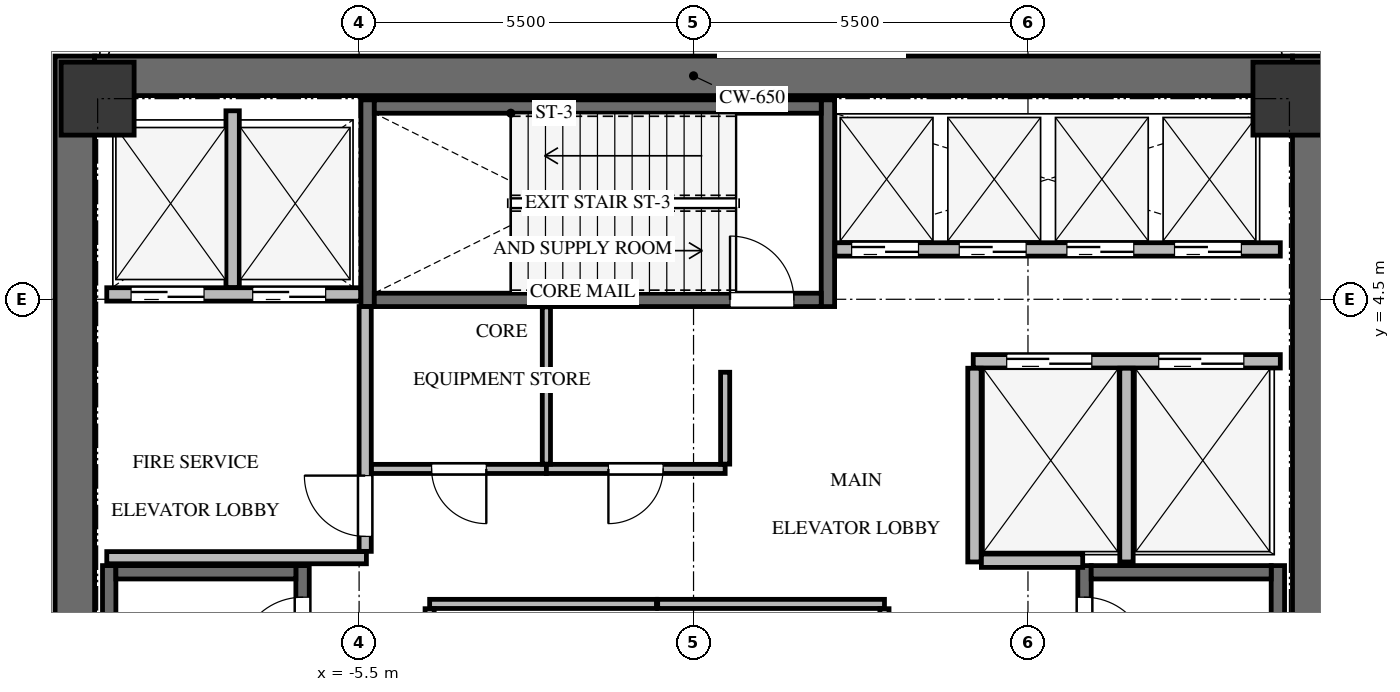
"""IFC4 building model, lengths in metres.
Left out: names, types, materials, properties, quantities, classifications, styles, units other than length and angle.
Written with IfcOpenShell. Run it as: python <this file> out.ifc"""

import sys

from ifc_helpers import new_model, si_unit, direction, frame, frame_2d, origin, origin_2d, place, context, subcontext, project, spatial, rectangle, extrude, source, transform, mapped, element, fill, save


model = new_model("IFC4")
c1 = context("Model", 3, precision=1e-05, world=origin(), true_north=direction((0.0, 1.0)))
c2 = subcontext(c1, "Body", "Model", "MODEL_VIEW")
j1 = project(units=[si_unit("LENGTHUNIT", "METRE"), si_unit("PLANEANGLEUNIT", "RADIAN")], contexts=[c1])
p1 = place(None, origin())
s1 = spatial("IfcSite", under=j1, at=p1, CompositionType="ELEMENT")
p2 = place(p1, origin())
s2 = spatial("IfcBuilding", under=s1, at=p2, CompositionType="ELEMENT")
p3 = place(p2, frame((0.0, 0.0, 213.4)))
s3 = spatial("IfcBuildingStorey", under=s2, at=p3, CompositionType="ELEMENT", Elevation=213.4)
for number, where, z_axis, x_axis in (
    (1, (-10.175, -8.5, 0.0), (0.0, 0.0, 1.0), (0.0, 1.0, 0.0)),
    (2, (10.175, -8.5, 0.0), (0.0, 0.0, 1.0), (0.0, 1.0, 0.0)),
):
    element("IfcWall", number, at=place(p3, frame(where, z_axis=z_axis, x_axis=x_axis)), inside=s3, PredefinedType="SHEAR", context=c2, shape_type="SweptSolid", body=[
        extrude(rectangle(XDim=17.0, YDim=0.65, at=frame_2d((8.5, 0.0))), origin(), (0.0, 0.0, 1.0), 4.9),
    ])
p4 = place(p3, frame((-9.85, 8.175, 0.0), z_axis=(0.0, 0.0, 1.0), x_axis=(1.0, 0.0, 0.0)))
e3 = element("IfcWall", 3, at=p4, inside=s3, PredefinedType="SHEAR", context=c2, shape_type="SweptSolid", body=[
    extrude(rectangle(XDim=19.7, YDim=0.65, at=frame_2d((9.85, 0.0))), origin(), (0.0, 0.0, 1.0), 4.9),
])
p5 = place(p3, frame((-6.43, -7.77, -0.3), z_axis=(0.0, 0.0, 1.0), x_axis=(0.0, 1.0, 0.0)))
e4 = element("IfcWall", 4, at=p5, inside=s3, PredefinedType="SHEAR", context=c2, shape_type="SweptSolid", body=[
    extrude(rectangle(XDim=7.89, YDim=0.22, at=frame_2d((3.945, 0.0))), origin(), (0.0, 0.0, 1.0), 4.96),
])
p6 = place(p5, frame((6.32, 0.0, 0.0)))
e5 = element("IfcOpeningElement", 5, at=p6, cuts=e4, PredefinedType="OPENING", context=c2, shape_type="SweptSolid", body=[
    extrude(rectangle(XDim=1.05, YDim=2.15, at=frame_2d((0.525, 1.075))), frame((0.0, 0.12, 0.0), z_axis=(0.0, -1.0, 0.0), x_axis=(1.0, 0.0, 0.0)), (0.0, 0.0, 1.0), 0.24),
])
p7 = place(p3, frame((-9.61, 0.12, -0.3), z_axis=(0.0, 0.0, 1.0), x_axis=(0.0, -1.0, 0.0)))
e6 = element("IfcWall", 6, at=p7, inside=s3, PredefinedType="SHEAR", context=c2, shape_type="SweptSolid", body=[
    extrude(rectangle(XDim=7.89, YDim=0.22, at=frame_2d((3.945, 0.0))), origin(), (0.0, 0.0, 1.0), 4.96),
])
p8 = place(p3, frame((-6.54, 0.01, -0.3), z_axis=(0.0, 0.0, 1.0), x_axis=(-1.0, 0.0, 0.0)))
e7 = element("IfcWall", 7, at=p8, inside=s3, PredefinedType="SHEAR", context=c2, shape_type="SweptSolid", body=[
    extrude(rectangle(XDim=2.96, YDim=0.22, at=frame_2d((1.48, 0.0))), origin(), (0.0, 0.0, 1.0), 4.96),
])
p9 = place(p3, frame((9.61, -7.77, -0.3), z_axis=(0.0, 0.0, 1.0), x_axis=(0.0, 1.0, 0.0)))
e8 = element("IfcWall", 8, at=p9, inside=s3, PredefinedType="SHEAR", context=c2, shape_type="SweptSolid", body=[
    extrude(rectangle(XDim=7.89, YDim=0.22, at=frame_2d((3.945, 0.0))), origin(), (0.0, 0.0, 1.0), 4.96),
])
p10 = place(p3, frame((6.43, 0.12, -0.3), z_axis=(0.0, 0.0, 1.0), x_axis=(0.0, -1.0, 0.0)))
e9 = element("IfcWall", 9, at=p10, inside=s3, PredefinedType="SHEAR", context=c2, shape_type="SweptSolid", body=[
    extrude(rectangle(XDim=7.89, YDim=0.22, at=frame_2d((3.945, 0.0))), origin(), (0.0, 0.0, 1.0), 4.96),
])
p11 = place(p10, frame((0.52, 0.0, 0.0)))
e10 = element("IfcOpeningElement", 10, at=p11, cuts=e9, PredefinedType="OPENING", context=c2, shape_type="SweptSolid", body=[
    extrude(rectangle(XDim=1.05, YDim=2.15, at=frame_2d((0.525, 1.075))), frame((0.0, 0.12, 0.0), z_axis=(0.0, -1.0, 0.0), x_axis=(1.0, 0.0, 0.0)), (0.0, 0.0, 1.0), 0.24),
])
p12 = place(p3, frame((9.5, 0.01, -0.3), z_axis=(0.0, 0.0, 1.0), x_axis=(-1.0, 0.0, 0.0)))
e11 = element("IfcWall", 11, at=p12, inside=s3, PredefinedType="SHEAR", context=c2, shape_type="SweptSolid", body=[
    extrude(rectangle(XDim=2.96, YDim=0.22, at=frame_2d((1.48, 0.0))), origin(), (0.0, 0.0, 1.0), 4.96),
])
for number, where, z_axis, x_axis in (
    (12, (2.21, 4.38, -0.3), (0.0, 0.0, 1.0), (0.0, 1.0, 0.0)),
    (13, (-5.36, 7.78, -0.3), (0.0, 0.0, 1.0), (0.0, -1.0, 0.0)),
):
    element("IfcWall", number, at=place(p3, frame(where, z_axis=z_axis, x_axis=x_axis)), inside=s3, PredefinedType="SHEAR", context=c2, shape_type="SweptSolid", body=[
        extrude(rectangle(XDim=3.4, YDim=0.22, at=frame_2d((1.7, 0.0))), origin(), (0.0, 0.0, 1.0), 4.96),
    ])
p13 = place(p3, frame((-5.25, 4.49, -0.3), z_axis=(0.0, 0.0, 1.0), x_axis=(1.0, 0.0, 0.0)))
e14 = element("IfcWall", 14, at=p13, inside=s3, PredefinedType="SHEAR", context=c2, shape_type="SweptSolid", body=[
    extrude(rectangle(XDim=7.35, YDim=0.22, at=frame_2d((3.675, 0.0))), origin(), (0.0, 0.0, 1.0), 4.96),
])
p14 = place(p13, frame((5.85, 0.0, 0.0)))
e15 = element("IfcOpeningElement", 15, at=p14, cuts=e14, PredefinedType="OPENING", context=c2, shape_type="SweptSolid", body=[
    extrude(rectangle(XDim=1.05, YDim=2.15, at=frame_2d((0.525, 1.075))), frame((0.0, 0.12, 0.0), z_axis=(0.0, -1.0, 0.0), x_axis=(1.0, 0.0, 0.0)), (0.0, 0.0, 1.0), 0.24),
])
p15 = place(p3, frame((2.1, 7.67, -0.3), z_axis=(0.0, 0.0, 1.0), x_axis=(-1.0, 0.0, 0.0)))
e16 = element("IfcWall", 16, at=p15, inside=s3, PredefinedType="SHEAR", context=c2, shape_type="SweptSolid", body=[
    extrude(rectangle(XDim=7.35, YDim=0.22, at=frame_2d((3.675, 0.0))), origin(), (0.0, 0.0, 1.0), 4.96),
])
m1 = source(origin(), c2, "Body", "SweptSolid", [
    extrude(rectangle(XDim=1.2, YDim=1.2, at=origin_2d()), origin(), (0.0, 0.0, 1.0), 4.96),
])
for number, where, z_axis, x_axis in (
    (17, (9.8, 7.8, -0.3), (0.0, 0.0, 1.0), (1.0, 0.0, 0.0)),
    (18, (-9.8, 7.8, -0.3), (0.0, 0.0, 1.0), (1.0, 0.0, 0.0)),
):
    element("IfcColumn", number, at=place(p3, frame(where, z_axis=z_axis, x_axis=x_axis)), inside=s3, PredefinedType="COLUMN", context=c2, shape_type="MappedRepresentation", body=[
        mapped(m1, transform((0.0, 0.0, 0.0), x_axis=(1.0, 0.0, 0.0), y_axis=(0.0, 1.0, 0.0), z_axis=(0.0, 0.0, 1.0), scale=1.0)),
    ])
p16 = place(p3, frame((-9.65, 4.58, 0.0), z_axis=(0.0, 0.0, 1.0), x_axis=(1.0, 0.0, 0.0)))
e19 = element("IfcWall", 19, at=p16, inside=s3, PredefinedType="SOLIDWALL", context=c2, shape_type="SweptSolid", body=[
    extrude(rectangle(XDim=4.175, YDim=0.22, at=frame_2d((2.087, 0.0))), origin(), (0.0, 0.0, 1.0), 4.645),
])
p17 = place(p16, frame((0.4, 0.0, 0.0)))
e20 = element("IfcOpeningElement", 20, at=p17, cuts=e19, PredefinedType="OPENING", context=c2, shape_type="SweptSolid", body=[
    extrude(rectangle(XDim=1.2, YDim=2.15, at=frame_2d((0.6, 1.075))), frame((0.0, 0.12, 0.0), z_axis=(0.0, -1.0, 0.0), x_axis=(1.0, 0.0, 0.0)), (0.0, 0.0, 1.0), 0.24),
])
p18 = place(p16, frame((2.4, 0.0, 0.0)))
e21 = element("IfcOpeningElement", 21, at=p18, cuts=e19, PredefinedType="OPENING", context=c2, shape_type="SweptSolid", body=[
    extrude(rectangle(XDim=1.2, YDim=2.15, at=frame_2d((0.6, 1.075))), frame((0.0, 0.12, 0.0), z_axis=(0.0, -1.0, 0.0), x_axis=(1.0, 0.0, 0.0)), (0.0, 0.0, 1.0), 0.24),
])
p19 = place(p3, frame((-7.58, 4.694, 0.0), z_axis=(0.0, 0.0, 1.0), x_axis=(0.0, 1.0, 0.0)))
e22 = element("IfcWall", 22, at=p19, inside=s3, PredefinedType="SOLIDWALL", context=c2, shape_type="SweptSolid", body=[
    extrude(rectangle(XDim=2.906, YDim=0.22, at=frame_2d((1.453, 0.0))), origin(), (0.0, 0.0, 1.0), 4.645),
])
p20 = place(p3, frame((-9.65, 0.25, 0.0), z_axis=(0.0, 0.0, 1.0), x_axis=(1.0, 0.0, 0.0)))
e23 = element("IfcWall", 23, at=p20, inside=s3, PredefinedType="SOLIDWALL", context=c2, shape_type="SweptSolid", body=[
    extrude(rectangle(XDim=4.27, YDim=0.2, at=frame_2d((2.135, 0.0))), origin(), (0.0, 0.0, 1.0), 4.645),
])
p21 = place(p3, frame((-5.4, 0.354, 0.0), z_axis=(0.0, 0.0, 1.0), x_axis=(0.0, 1.0, 0.0)))
e24 = element("IfcWall", 24, at=p21, inside=s3, PredefinedType="SOLIDWALL", context=c2, shape_type="SweptSolid", body=[
    extrude(rectangle(XDim=4.026, YDim=0.2, at=frame_2d((2.013, 0.0))), origin(), (0.0, 0.0, 1.0), 4.645),
])
p22 = place(p21, frame((0.246, 0.0, 0.0)))
e25 = element("IfcOpeningElement", 25, at=p22, cuts=e24, PredefinedType="OPENING", context=c2, shape_type="SweptSolid", body=[
    extrude(rectangle(XDim=1.0, YDim=2.15, at=frame_2d((0.5, 1.075))), frame((0.0, 0.11, 0.0), z_axis=(0.0, -1.0, 0.0), x_axis=(1.0, 0.0, 0.0)), (0.0, 0.0, 1.0), 0.22),
])
p23 = place(p3, frame((4.6, 3.48, 0.0), z_axis=(0.0, 0.0, 1.0), x_axis=(1.0, 0.0, 0.0)))
e26 = element("IfcWall", 26, at=p23, inside=s3, PredefinedType="SOLIDWALL", context=c2, shape_type="SweptSolid", body=[
    extrude(rectangle(XDim=5.05, YDim=0.22, at=frame_2d((2.525, 0.0))), origin(), (0.0, 0.0, 1.0), 4.645),
])
p24 = place(p23, frame((0.55, 0.0, 0.0)))
e27 = element("IfcOpeningElement", 27, at=p24, cuts=e26, PredefinedType="OPENING", context=c2, shape_type="SweptSolid", body=[
    extrude(rectangle(XDim=1.4, YDim=2.15, at=frame_2d((0.7, 1.075))), frame((0.0, 0.12, 0.0), z_axis=(0.0, -1.0, 0.0), x_axis=(1.0, 0.0, 0.0)), (0.0, 0.0, 1.0), 0.24),
])
p25 = place(p23, frame((3.05, 0.0, 0.0)))
e28 = element("IfcOpeningElement", 28, at=p25, cuts=e26, PredefinedType="OPENING", context=c2, shape_type="SweptSolid", body=[
    extrude(rectangle(XDim=1.4, YDim=2.15, at=frame_2d((0.7, 1.075))), frame((0.0, 0.12, 0.0), z_axis=(0.0, -1.0, 0.0), x_axis=(1.0, 0.0, 0.0)), (0.0, 0.0, 1.0), 0.24),
])
for number, where, z_axis, x_axis in (
    (29, (4.62, 0.18, 0.0), (0.0, 0.0, 1.0), (0.0, 1.0, 0.0)),
    (30, (7.12, 0.18, 0.0), (0.0, 0.0, 1.0), (0.0, 1.0, 0.0)),
):
    element("IfcWall", number, at=place(p3, frame(where, z_axis=z_axis, x_axis=x_axis)), inside=s3, PredefinedType="SOLIDWALL", context=c2, shape_type="SweptSolid", body=[
        extrude(rectangle(XDim=3.186, YDim=0.22, at=frame_2d((1.593, 0.0))), origin(), (0.0, 0.0, 1.0), 4.645),
    ])
p26 = place(p3, frame((4.734, 0.2, 0.0), z_axis=(0.0, 0.0, 1.0), x_axis=(1.0, 0.0, 0.0)))
e31 = element("IfcWall", 31, at=p26, inside=s3, PredefinedType="SOLIDWALL", context=c2, shape_type="SweptSolid", body=[
    extrude(rectangle(XDim=1.666, YDim=0.22, at=frame_2d((0.833, 0.0))), origin(), (0.0, 0.0, 1.0), 4.645),
])
p27 = place(p3, frame((2.325, 5.32, 0.0), z_axis=(0.0, 0.0, 1.0), x_axis=(1.0, 0.0, 0.0)))
e32 = element("IfcWall", 32, at=p27, inside=s3, PredefinedType="SOLIDWALL", context=c2, shape_type="SweptSolid", body=[
    extrude(rectangle(XDim=7.325, YDim=0.22, at=frame_2d((3.663, 0.0))), origin(), (0.0, 0.0, 1.0), 4.645),
])
p28 = place(p27, frame((0.275, 0.0, 0.0)))
e33 = element("IfcOpeningElement", 33, at=p28, cuts=e32, PredefinedType="OPENING", context=c2, shape_type="SweptSolid", body=[
    extrude(rectangle(XDim=1.1, YDim=2.15, at=frame_2d((0.55, 1.075))), frame((0.0, 0.12, 0.0), z_axis=(0.0, -1.0, 0.0), x_axis=(1.0, 0.0, 0.0)), (0.0, 0.0, 1.0), 0.24),
])
p29 = place(p27, frame((2.045, 0.0, 0.0)))
e34 = element("IfcOpeningElement", 34, at=p29, cuts=e32, PredefinedType="OPENING", context=c2, shape_type="SweptSolid", body=[
    extrude(rectangle(XDim=1.1, YDim=2.15, at=frame_2d((0.55, 1.075))), frame((0.0, 0.12, 0.0), z_axis=(0.0, -1.0, 0.0), x_axis=(1.0, 0.0, 0.0)), (0.0, 0.0, 1.0), 0.24),
])
p30 = place(p27, frame((3.815, 0.0, 0.0)))
e35 = element("IfcOpeningElement", 35, at=p30, cuts=e32, PredefinedType="OPENING", context=c2, shape_type="SweptSolid", body=[
    extrude(rectangle(XDim=1.1, YDim=2.15, at=frame_2d((0.55, 1.075))), frame((0.0, 0.12, 0.0), z_axis=(0.0, -1.0, 0.0), x_axis=(1.0, 0.0, 0.0)), (0.0, 0.0, 1.0), 0.24),
])
p31 = place(p27, frame((5.585, 0.0, 0.0)))
e36 = element("IfcOpeningElement", 36, at=p31, cuts=e32, PredefinedType="OPENING", context=c2, shape_type="SweptSolid", body=[
    extrude(rectangle(XDim=1.1, YDim=2.15, at=frame_2d((0.55, 1.075))), frame((0.0, 0.12, 0.0), z_axis=(0.0, -1.0, 0.0), x_axis=(1.0, 0.0, 0.0)), (0.0, 0.0, 1.0), 0.24),
])
p32 = place(p3, frame((-4.34, -0.51, 0.0), z_axis=(0.0, 0.0, 1.0), x_axis=(1.0, 0.0, 0.0)))
e37 = element("IfcWall", 37, at=p32, inside=s3, PredefinedType="PARTITIONING", context=c2, shape_type="SweptSolid", body=[
    extrude(rectangle(XDim=3.73, YDim=0.15, at=frame_2d((1.865, 0.0))), origin(), (0.0, 0.0, 1.0), 4.645),
])
p33 = place(p3, frame((-4.34, -2.961, 0.0), z_axis=(0.0, 0.0, 1.0), x_axis=(0.0, 1.0, 0.0)))
e38 = element("IfcWall", 38, at=p33, inside=s3, PredefinedType="PARTITIONING", context=c2, shape_type="SweptSolid", body=[
    extrude(rectangle(XDim=2.372, YDim=0.15, at=frame_2d((1.186, 0.0))), origin(), (0.0, 0.0, 1.0), 4.645),
])
p34 = place(p3, frame((-0.59, -0.51, 0.0), z_axis=(0.0, 0.0, 1.0), x_axis=(1.0, 0.0, 0.0)))
e39 = element("IfcWall", 39, at=p34, inside=s3, PredefinedType="PARTITIONING", context=c2, shape_type="SweptSolid", body=[
    extrude(rectangle(XDim=3.73, YDim=0.15, at=frame_2d((1.865, 0.0))), origin(), (0.0, 0.0, 1.0), 4.645),
])
p35 = place(p3, frame((3.14, -0.589, 0.0), z_axis=(0.0, 0.0, 1.0), x_axis=(0.0, -1.0, 0.0)))
e40 = element("IfcWall", 40, at=p35, inside=s3, PredefinedType="PARTITIONING", context=c2, shape_type="SweptSolid", body=[
    extrude(rectangle(XDim=2.372, YDim=0.15, at=frame_2d((1.186, 0.0))), origin(), (0.0, 0.0, 1.0), 4.645),
])
p36 = place(p3, frame((-2.42, 1.71, 0.0), z_axis=(0.0, 0.0, 1.0), x_axis=(-1.0, 0.0, 0.0)))
e41 = element("IfcWall", 41, at=p36, inside=s3, PredefinedType="PARTITIONING", context=c2, shape_type="SweptSolid", body=[
    extrude(rectangle(XDim=2.876, YDim=0.15, at=frame_2d((1.438, 0.0))), origin(), (0.0, 0.0, 1.0), 4.645),
])
p37 = place(p36, frame((0.988, 0.0, 0.0)))
e42 = element("IfcOpeningElement", 42, at=p37, cuts=e41, PredefinedType="OPENING", context=c2, shape_type="SweptSolid", body=[
    extrude(rectangle(XDim=0.9, YDim=2.05, at=frame_2d((0.45, 1.025))), frame((0.0, 0.085, 0.0), z_axis=(0.0, -1.0, 0.0), x_axis=(1.0, 0.0, 0.0)), (0.0, 0.0, 1.0), 0.17),
])
p38 = place(p3, frame((0.52, 1.71, 0.0), z_axis=(0.0, 0.0, 1.0), x_axis=(-1.0, 0.0, 0.0)))
e43 = element("IfcWall", 43, at=p38, inside=s3, PredefinedType="PARTITIONING", context=c2, shape_type="SweptSolid", body=[
    extrude(rectangle(XDim=2.94, YDim=0.15, at=frame_2d((1.47, 0.0))), origin(), (0.0, 0.0, 1.0), 4.645),
])
p39 = place(p38, frame((1.02, 0.0, 0.0)))
e44 = element("IfcOpeningElement", 44, at=p39, cuts=e43, PredefinedType="OPENING", context=c2, shape_type="SweptSolid", body=[
    extrude(rectangle(XDim=0.9, YDim=2.05, at=frame_2d((0.45, 1.025))), frame((0.0, 0.085, 0.0), z_axis=(0.0, -1.0, 0.0), x_axis=(1.0, 0.0, 0.0)), (0.0, 0.0, 1.0), 0.17),
])
p40 = place(p3, frame((0.52, 3.3, 0.0), z_axis=(0.0, 0.0, 1.0), x_axis=(0.0, -1.0, 0.0)))
e45 = element("IfcWall", 45, at=p40, inside=s3, PredefinedType="PARTITIONING", context=c2, shape_type="SweptSolid", body=[
    extrude(rectangle(XDim=1.511, YDim=0.15, at=frame_2d((0.755, 0.0))), origin(), (0.0, 0.0, 1.0), 4.645),
])
p41 = place(p3, frame((-2.42, 4.375, 0.0), z_axis=(0.0, 0.0, 1.0), x_axis=(0.0, -1.0, 0.0)))
e46 = element("IfcWall", 46, at=p41, inside=s3, PredefinedType="PARTITIONING", context=c2, shape_type="SweptSolid", body=[
    extrude(rectangle(XDim=2.586, YDim=0.135, at=frame_2d((1.293, 0.0))), origin(), (0.0, 0.0, 1.0), 4.645),
])
m2 = source(origin(), c2, "Body", "SweptSolid", [
    extrude(rectangle(XDim=1.05, YDim=2.15, at=frame_2d((0.525, 1.075))), frame((0.0, 0.025, 0.0), z_axis=(0.0, -1.0, 0.0), x_axis=(1.0, 0.0, 0.0)), (0.0, 0.0, 1.0), 0.05),
])
p42 = place(p6, origin())
e47 = element("IfcDoor", 47, at=p42, inside=s3, OperationType="SINGLE_SWING_LEFT", PredefinedType="DOOR", context=c2, shape_type="MappedRepresentation", body=[
    mapped(m2, transform((0.0, 0.0, 0.0), x_axis=(1.0, 0.0, 0.0), y_axis=(0.0, 1.0, 0.0), z_axis=(0.0, 0.0, 1.0), scale=1.0)),
])
fill(e5, e47)
m3 = source(origin(), c2, "Body", "SweptSolid", [
    extrude(rectangle(XDim=1.05, YDim=2.15, at=frame_2d((0.525, 1.075))), frame((0.0, 0.025, 0.0), z_axis=(0.0, -1.0, 0.0), x_axis=(1.0, 0.0, 0.0)), (0.0, 0.0, 1.0), 0.05),
])
p43 = place(p11, origin())
e48 = element("IfcDoor", 48, at=p43, inside=s3, OperationType="SINGLE_SWING_RIGHT", PredefinedType="DOOR", context=c2, shape_type="MappedRepresentation", body=[
    mapped(m3, transform((0.0, 0.0, 0.0), x_axis=(1.0, 0.0, 0.0), y_axis=(0.0, 1.0, 0.0), z_axis=(0.0, 0.0, 1.0), scale=1.0)),
])
fill(e10, e48)
p44 = place(p14, origin())
e49 = element("IfcDoor", 49, at=p44, inside=s3, OperationType="SINGLE_SWING_LEFT", PredefinedType="DOOR", context=c2, shape_type="MappedRepresentation", body=[
    mapped(m2, transform((0.0, 0.0, 0.0), x_axis=(1.0, 0.0, 0.0), y_axis=(0.0, 1.0, 0.0), z_axis=(0.0, 0.0, 1.0), scale=1.0)),
])
fill(e15, e49)
m4 = source(origin(), c2, "Body", "SweptSolid", [
    extrude(rectangle(XDim=1.2, YDim=2.15, at=frame_2d((0.6, 1.075))), frame((0.0, 0.025, 0.0), z_axis=(0.0, -1.0, 0.0), x_axis=(1.0, 0.0, 0.0)), (0.0, 0.0, 1.0), 0.05),
])
p45 = place(p17, origin())
e50 = element("IfcDoor", 50, at=p45, inside=s3, OperationType="DOUBLE_DOOR_SLIDING", PredefinedType="DOOR", context=c2, shape_type="MappedRepresentation", body=[
    mapped(m4, transform((0.0, 0.0, 0.0), x_axis=(1.0, 0.0, 0.0), y_axis=(0.0, 1.0, 0.0), z_axis=(0.0, 0.0, 1.0), scale=1.0)),
])
fill(e20, e50)
p46 = place(p18, origin())
e51 = element("IfcDoor", 51, at=p46, inside=s3, OperationType="DOUBLE_DOOR_SLIDING", PredefinedType="DOOR", context=c2, shape_type="MappedRepresentation", body=[
    mapped(m4, transform((0.0, 0.0, 0.0), x_axis=(1.0, 0.0, 0.0), y_axis=(0.0, 1.0, 0.0), z_axis=(0.0, 0.0, 1.0), scale=1.0)),
])
fill(e21, e51)
m5 = source(origin(), c2, "Body", "SweptSolid", [
    extrude(rectangle(XDim=1.0, YDim=2.15, at=frame_2d((0.5, 1.075))), frame((0.0, 0.025, 0.0), z_axis=(0.0, -1.0, 0.0), x_axis=(1.0, 0.0, 0.0)), (0.0, 0.0, 1.0), 0.05),
])
p47 = place(p22, origin())
e52 = element("IfcDoor", 52, at=p47, inside=s3, OperationType="SINGLE_SWING_RIGHT", PredefinedType="DOOR", context=c2, shape_type="MappedRepresentation", body=[
    mapped(m5, transform((0.0, 0.0, 0.0), x_axis=(1.0, 0.0, 0.0), y_axis=(0.0, 1.0, 0.0), z_axis=(0.0, 0.0, 1.0), scale=1.0)),
])
fill(e25, e52)
m6 = source(origin(), c2, "Body", "SweptSolid", [
    extrude(rectangle(XDim=1.4, YDim=2.15, at=frame_2d((0.7, 1.075))), frame((0.0, 0.025, 0.0), z_axis=(0.0, -1.0, 0.0), x_axis=(1.0, 0.0, 0.0)), (0.0, 0.0, 1.0), 0.05),
])
p48 = place(p24, origin())
e53 = element("IfcDoor", 53, at=p48, inside=s3, OperationType="DOUBLE_DOOR_SLIDING", PredefinedType="DOOR", context=c2, shape_type="MappedRepresentation", body=[
    mapped(m6, transform((0.0, 0.0, 0.0), x_axis=(1.0, 0.0, 0.0), y_axis=(0.0, 1.0, 0.0), z_axis=(0.0, 0.0, 1.0), scale=1.0)),
])
fill(e27, e53)
p49 = place(p25, origin())
e54 = element("IfcDoor", 54, at=p49, inside=s3, OperationType="DOUBLE_DOOR_SLIDING", PredefinedType="DOOR", context=c2, shape_type="MappedRepresentation", body=[
    mapped(m6, transform((0.0, 0.0, 0.0), x_axis=(1.0, 0.0, 0.0), y_axis=(0.0, 1.0, 0.0), z_axis=(0.0, 0.0, 1.0), scale=1.0)),
])
fill(e28, e54)
m7 = source(origin(), c2, "Body", "SweptSolid", [
    extrude(rectangle(XDim=1.1, YDim=2.15, at=frame_2d((0.55, 1.075))), frame((0.0, 0.025, 0.0), z_axis=(0.0, -1.0, 0.0), x_axis=(1.0, 0.0, 0.0)), (0.0, 0.0, 1.0), 0.05),
])
p50 = place(p28, origin())
e55 = element("IfcDoor", 55, at=p50, inside=s3, OperationType="DOUBLE_DOOR_SLIDING", PredefinedType="DOOR", context=c2, shape_type="MappedRepresentation", body=[
    mapped(m7, transform((0.0, 0.0, 0.0), x_axis=(1.0, 0.0, 0.0), y_axis=(0.0, 1.0, 0.0), z_axis=(0.0, 0.0, 1.0), scale=1.0)),
])
fill(e33, e55)
p51 = place(p29, origin())
e56 = element("IfcDoor", 56, at=p51, inside=s3, OperationType="DOUBLE_DOOR_SLIDING", PredefinedType="DOOR", context=c2, shape_type="MappedRepresentation", body=[
    mapped(m7, transform((0.0, 0.0, 0.0), x_axis=(1.0, 0.0, 0.0), y_axis=(0.0, 1.0, 0.0), z_axis=(0.0, 0.0, 1.0), scale=1.0)),
])
fill(e34, e56)
p52 = place(p30, origin())
e57 = element("IfcDoor", 57, at=p52, inside=s3, OperationType="DOUBLE_DOOR_SLIDING", PredefinedType="DOOR", context=c2, shape_type="MappedRepresentation", body=[
    mapped(m7, transform((0.0, 0.0, 0.0), x_axis=(1.0, 0.0, 0.0), y_axis=(0.0, 1.0, 0.0), z_axis=(0.0, 0.0, 1.0), scale=1.0)),
])
fill(e35, e57)
p53 = place(p31, origin())
e58 = element("IfcDoor", 58, at=p53, inside=s3, OperationType="DOUBLE_DOOR_SLIDING", PredefinedType="DOOR", context=c2, shape_type="MappedRepresentation", body=[
    mapped(m7, transform((0.0, 0.0, 0.0), x_axis=(1.0, 0.0, 0.0), y_axis=(0.0, 1.0, 0.0), z_axis=(0.0, 0.0, 1.0), scale=1.0)),
])
fill(e36, e58)
m8 = source(origin(), c2, "Body", "SweptSolid", [
    extrude(rectangle(XDim=0.9, YDim=2.05, at=frame_2d((0.45, 1.025))), frame((0.0, 0.025, 0.0), z_axis=(0.0, -1.0, 0.0), x_axis=(1.0, 0.0, 0.0)), (0.0, 0.0, 1.0), 0.05),
])
p54 = place(p37, origin())
e59 = element("IfcDoor", 59, at=p54, inside=s3, OperationType="SINGLE_SWING_LEFT", PredefinedType="DOOR", context=c2, shape_type="MappedRepresentation", body=[
    mapped(m8, transform((0.0, 0.0, 0.0), x_axis=(1.0, 0.0, 0.0), y_axis=(0.0, 1.0, 0.0), z_axis=(0.0, 0.0, 1.0), scale=1.0)),
])
fill(e42, e59)
m9 = source(origin(), c2, "Body", "SweptSolid", [
    extrude(rectangle(XDim=0.9, YDim=2.05, at=frame_2d((0.45, 1.025))), frame((0.0, 0.025, 0.0), z_axis=(0.0, -1.0, 0.0), x_axis=(1.0, 0.0, 0.0)), (0.0, 0.0, 1.0), 0.05),
])
p55 = place(p39, origin())
e60 = element("IfcDoor", 60, at=p55, inside=s3, OperationType="SINGLE_SWING_RIGHT", PredefinedType="DOOR", context=c2, shape_type="MappedRepresentation", body=[
    mapped(m9, transform((0.0, 0.0, 0.0), x_axis=(1.0, 0.0, 0.0), y_axis=(0.0, 1.0, 0.0), z_axis=(0.0, 0.0, 1.0), scale=1.0)),
])
fill(e44, e60)
save(model, sys.argv[1])
